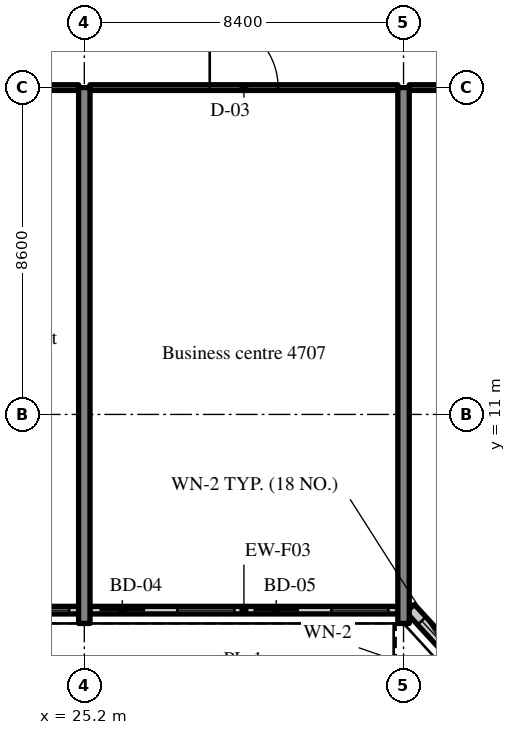
"""IFC4 building model, lengths in metres.
Left out: names, types, materials, properties, quantities, classifications, styles, units other than length and angle.
Written with IfcOpenShell. Run it as: python <this file> out.ifc"""

import sys

from ifc_helpers import new_model, si_unit, direction, frame, frame_2d, origin, place, context, subcontext, project, spatial, rectangle, extrude, source, transform, mapped, element, fill, save


model = new_model("IFC4")
c1 = context("Model", 3, precision=1e-05, world=origin(), true_north=direction((0.0, 1.0)))
c2 = subcontext(c1, "Body", "Model", "MODEL_VIEW")
j1 = project(units=[si_unit("LENGTHUNIT", "METRE"), si_unit("PLANEANGLEUNIT", "RADIAN")], contexts=[c1])
p1 = place(None, origin())
s1 = spatial("IfcSite", under=j1, at=p1, CompositionType="ELEMENT")
p2 = place(p1, origin())
s2 = spatial("IfcBuilding", under=s1, at=p2, CompositionType="ELEMENT")
p3 = place(p2, frame((0.0, 0.0, 193.4)))
s3 = spatial("IfcBuildingStorey", under=s2, at=p3, CompositionType="ELEMENT", Elevation=193.4)
m1 = source(origin(), c2, "Body", "SweptSolid", [
    extrude(rectangle(XDim=14.1, YDim=0.3, at=frame_2d((7.05, 0.0))), origin(), (0.0, 0.0, 1.0), 3.52),
])
for number, where, z_axis, x_axis in (
    (1, (25.2, 5.5, 0.0), (0.0, 0.0, 1.0), (0.0, 1.0, 0.0)),
    (2, (33.6, 5.5, 0.0), (0.0, 0.0, 1.0), (0.0, 1.0, 0.0)),
):
    element("IfcWall", number, at=place(p3, frame(where, z_axis=z_axis, x_axis=x_axis)), inside=s3, PredefinedType="SHEAR", context=c2, shape_type="MappedRepresentation", body=[
        mapped(m1, transform((0.0, 0.0, 0.0), scale=1.0)),
    ])
m2 = source(origin(), c2, "Body", "SweptSolid", [
    extrude(rectangle(XDim=8.1, YDim=0.2, at=frame_2d((4.05, 0.0))), origin(), (0.0, 0.0, 1.0), 2.87),
])
p4 = place(p3, frame((16.95, 5.85, 0.0), z_axis=(0.0, 0.0, 1.0), x_axis=(1.0, 0.0, 0.0)))
e3 = element("IfcWall", 3, at=p4, inside=s3, PredefinedType="SOLIDWALL", context=c2, shape_type="MappedRepresentation", body=[
    mapped(m2, transform((0.0, 0.0, 0.0), scale=1.0)),
])
m3 = source(origin(), c2, "Body", "SweptSolid", [
    extrude(rectangle(XDim=1.2, YDim=2.4, at=frame_2d((0.6, 1.2))), frame((0.0, 0.11, 0.0), z_axis=(0.0, -1.0, 0.0), x_axis=(1.0, 0.0, 0.0)), (0.0, 0.0, 1.0), 0.22),
])
p5 = place(p4, frame((0.25, 0.0, 0.0)))
e4 = element("IfcOpeningElement", 4, at=p5, cuts=e3, PredefinedType="OPENING", context=c2, shape_type="MappedRepresentation", body=[
    mapped(m3, transform((0.0, 0.0, 0.0), scale=1.0)),
])
m4 = source(origin(), c2, "Body", "SweptSolid", [
    extrude(rectangle(XDim=1.5, YDim=1.5, at=frame_2d((0.75, 0.75))), frame((0.0, 0.11, 0.0), z_axis=(0.0, -1.0, 0.0), x_axis=(1.0, 0.0, 0.0)), (0.0, 0.0, 1.0), 0.22),
])
p6 = place(p4, frame((2.3, 0.0, 0.9)))
e5 = element("IfcOpeningElement", 5, at=p6, cuts=e3, PredefinedType="OPENING", context=c2, shape_type="MappedRepresentation", body=[
    mapped(m4, transform((0.0, 0.0, 0.0), scale=1.0)),
])
p7 = place(p4, frame((4.3, 0.0, 0.0)))
e6 = element("IfcOpeningElement", 6, at=p7, cuts=e3, PredefinedType="OPENING", context=c2, shape_type="MappedRepresentation", body=[
    mapped(m3, transform((0.0, 0.0, 0.0), scale=1.0)),
])
p8 = place(p4, frame((6.35, 0.0, 0.9)))
e7 = element("IfcOpeningElement", 7, at=p8, cuts=e3, PredefinedType="OPENING", context=c2, shape_type="MappedRepresentation", body=[
    mapped(m4, transform((0.0, 0.0, 0.0), scale=1.0)),
])
m5 = source(origin(), c2, "Body", "SweptSolid", [
    extrude(rectangle(XDim=8.1, YDim=0.2, at=frame_2d((4.05, 0.0))), origin(), (0.0, 0.0, 1.0), 2.87),
])
p9 = place(p3, frame((25.35, 5.85, 0.0), z_axis=(0.0, 0.0, 1.0), x_axis=(1.0, 0.0, 0.0)))
e8 = element("IfcWall", 8, at=p9, inside=s3, PredefinedType="SOLIDWALL", context=c2, shape_type="MappedRepresentation", body=[
    mapped(m5, transform((0.0, 0.0, 0.0), scale=1.0)),
])
p10 = place(p9, frame((0.25, 0.0, 0.0)))
e9 = element("IfcOpeningElement", 9, at=p10, cuts=e8, PredefinedType="OPENING", context=c2, shape_type="MappedRepresentation", body=[
    mapped(m3, transform((0.0, 0.0, 0.0), scale=1.0)),
])
p11 = place(p9, frame((2.3, 0.0, 0.9)))
e10 = element("IfcOpeningElement", 10, at=p11, cuts=e8, PredefinedType="OPENING", context=c2, shape_type="MappedRepresentation", body=[
    mapped(m4, transform((0.0, 0.0, 0.0), scale=1.0)),
])
p12 = place(p9, frame((4.3, 0.0, 0.0)))
e11 = element("IfcOpeningElement", 11, at=p12, cuts=e8, PredefinedType="OPENING", context=c2, shape_type="MappedRepresentation", body=[
    mapped(m3, transform((0.0, 0.0, 0.0), scale=1.0)),
])
p13 = place(p9, frame((6.35, 0.0, 0.9)))
e12 = element("IfcOpeningElement", 12, at=p13, cuts=e8, PredefinedType="OPENING", context=c2, shape_type="MappedRepresentation", body=[
    mapped(m4, transform((0.0, 0.0, 0.0), scale=1.0)),
])
m6 = source(origin(), c2, "Body", "SweptSolid", [
    extrude(rectangle(XDim=2.398, YDim=0.3, at=frame_2d((1.199, 0.0))), origin(), (0.0, 0.0, 1.0), 3.52),
])
p14 = place(p3, frame((33.776, 5.9, 0.0), z_axis=(0.0, 0.0, 1.0), x_axis=(0.675374189419, -0.737475222815, 0.0)))
e13 = element("IfcWall", 13, at=p14, inside=s3, PredefinedType="SOLIDWALL", context=c2, shape_type="MappedRepresentation", body=[
    mapped(m6, transform((0.0, 0.0, 0.0), scale=1.0)),
])
m7 = source(origin(), c2, "Body", "SweptSolid", [
    extrude(rectangle(XDim=1.5, YDim=2.0, at=frame_2d((0.75, 1.0))), frame((0.0, 0.16, 0.0), z_axis=(0.0, -1.0, 0.0), x_axis=(1.0, 0.0, 0.0)), (0.0, 0.0, 1.0), 0.32),
])
p15 = place(p14, frame((0.449, 0.0, 0.9)))
e14 = element("IfcOpeningElement", 14, at=p15, cuts=e13, PredefinedType="OPENING", context=c2, shape_type="MappedRepresentation", body=[
    mapped(m7, transform((0.0, 0.0, 0.0), scale=1.0)),
])
m8 = source(origin(), c2, "Body", "SweptSolid", [
    extrude(rectangle(XDim=3.975, YDim=0.15, at=frame_2d((1.988, 0.0))), origin(), (0.0, 0.0, 1.0), 2.82),
])
p16 = place(p3, frame((21.075, 19.6, 0.0), z_axis=(0.0, 0.0, 1.0), x_axis=(1.0, 0.0, 0.0)))
e15 = element("IfcWall", 15, at=p16, inside=s3, PredefinedType="PARTITIONING", context=c2, shape_type="MappedRepresentation", body=[
    mapped(m8, transform((0.0, 0.0, 0.0), scale=1.0)),
])
m9 = source(origin(), c2, "Body", "SweptSolid", [
    extrude(rectangle(XDim=1.0, YDim=2.1, at=frame_2d((0.5, 1.05))), frame((0.0, 0.085, 0.0), z_axis=(0.0, -1.0, 0.0), x_axis=(1.0, 0.0, 0.0)), (0.0, 0.0, 1.0), 0.17),
])
p17 = place(p16, frame((1.488, 0.0, 0.0)))
e16 = element("IfcOpeningElement", 16, at=p17, cuts=e15, PredefinedType="OPENING", context=c2, shape_type="MappedRepresentation", body=[
    mapped(m9, transform((0.0, 0.0, 0.0), scale=1.0)),
])
m10 = source(origin(), c2, "Body", "SweptSolid", [
    extrude(rectangle(XDim=8.1, YDim=0.15, at=frame_2d((4.05, 0.0))), origin(), (0.0, 0.0, 1.0), 2.82),
])
p18 = place(p3, frame((25.35, 19.6, 0.0), z_axis=(0.0, 0.0, 1.0), x_axis=(1.0, 0.0, 0.0)))
e17 = element("IfcWall", 17, at=p18, inside=s3, PredefinedType="PARTITIONING", context=c2, shape_type="MappedRepresentation", body=[
    mapped(m10, transform((0.0, 0.0, 0.0), scale=1.0)),
])
m11 = source(origin(), c2, "Body", "SweptSolid", [
    extrude(rectangle(XDim=1.8, YDim=2.1, at=frame_2d((0.9, 1.05))), frame((0.0, 0.085, 0.0), z_axis=(0.0, -1.0, 0.0), x_axis=(1.0, 0.0, 0.0)), (0.0, 0.0, 1.0), 0.17),
])
p19 = place(p18, frame((3.15, 0.0, 0.0)))
e18 = element("IfcOpeningElement", 18, at=p19, cuts=e17, PredefinedType="OPENING", context=c2, shape_type="MappedRepresentation", body=[
    mapped(m11, transform((0.0, 0.0, 0.0), scale=1.0)),
])
m12 = source(origin(), c2, "Body", "SweptSolid", [
    extrude(rectangle(XDim=8.1, YDim=0.15, at=frame_2d((4.05, 0.0))), origin(), (0.0, 0.0, 1.0), 2.82),
])
p20 = place(p3, frame((33.75, 19.6, 0.0), z_axis=(0.0, 0.0, 1.0), x_axis=(1.0, 0.0, 0.0)))
e19 = element("IfcWall", 19, at=p20, inside=s3, PredefinedType="PARTITIONING", context=c2, shape_type="MappedRepresentation", body=[
    mapped(m12, transform((0.0, 0.0, 0.0), scale=1.0)),
])
p21 = place(p20, frame((3.15, 0.0, 0.0)))
e20 = element("IfcOpeningElement", 20, at=p21, cuts=e19, PredefinedType="OPENING", context=c2, shape_type="MappedRepresentation", body=[
    mapped(m11, transform((0.0, 0.0, 0.0), scale=1.0)),
])
m13 = source(origin(), c2, "Body", "SweptSolid", [
    extrude(rectangle(XDim=1.5, YDim=1.5, at=frame_2d((0.75, 0.75))), frame((0.0, 0.03, 0.0), z_axis=(0.0, -1.0, 0.0), x_axis=(1.0, 0.0, 0.0)), (0.0, 0.0, 1.0), 0.06),
])
p22 = place(p8, origin())
e21 = element("IfcWindow", 21, at=p22, inside=s3, PartitioningType="SINGLE_PANEL", PredefinedType="WINDOW", context=c2, shape_type="MappedRepresentation", body=[
    mapped(m13, transform((0.0, 0.0, 0.0), scale=1.0)),
])
fill(e7, e21)
m14 = source(origin(), c2, "Body", "SweptSolid", [
    extrude(rectangle(XDim=1.2, YDim=2.4, at=frame_2d((0.6, 1.2))), frame((0.0, 0.025, 0.0), z_axis=(0.0, -1.0, 0.0), x_axis=(1.0, 0.0, 0.0)), (0.0, 0.0, 1.0), 0.05),
])
p23 = place(p10, origin())
e22 = element("IfcDoor", 22, at=p23, inside=s3, OperationType="SLIDING_TO_RIGHT", PredefinedType="DOOR", context=c2, shape_type="MappedRepresentation", body=[
    mapped(m14, transform((0.0, 0.0, 0.0), scale=1.0)),
])
fill(e9, e22)
p24 = place(p11, origin())
e23 = element("IfcWindow", 23, at=p24, inside=s3, PartitioningType="SINGLE_PANEL", PredefinedType="WINDOW", context=c2, shape_type="MappedRepresentation", body=[
    mapped(m13, transform((0.0, 0.0, 0.0), scale=1.0)),
])
fill(e10, e23)
p25 = place(p12, origin())
e24 = element("IfcDoor", 24, at=p25, inside=s3, OperationType="SLIDING_TO_LEFT", PredefinedType="DOOR", context=c2, shape_type="MappedRepresentation", body=[
    mapped(m14, transform((0.0, 0.0, 0.0), scale=1.0)),
])
fill(e11, e24)
p26 = place(p13, origin())
e25 = element("IfcWindow", 25, at=p26, inside=s3, PartitioningType="SINGLE_PANEL", PredefinedType="WINDOW", context=c2, shape_type="MappedRepresentation", body=[
    mapped(m13, transform((0.0, 0.0, 0.0), scale=1.0)),
])
fill(e12, e25)
m15 = source(origin(), c2, "Body", "SweptSolid", [
    extrude(rectangle(XDim=1.5, YDim=2.0, at=frame_2d((0.75, 1.0))), frame((0.0, 0.03, 0.0), z_axis=(0.0, -1.0, 0.0), x_axis=(1.0, 0.0, 0.0)), (0.0, 0.0, 1.0), 0.06),
])
p27 = place(p15, origin())
e26 = element("IfcWindow", 26, at=p27, inside=s3, PartitioningType="SINGLE_PANEL", PredefinedType="WINDOW", context=c2, shape_type="MappedRepresentation", body=[
    mapped(m15, transform((0.0, 0.0, 0.0), scale=1.0)),
])
fill(e14, e26)
m16 = source(origin(), c2, "Body", "SweptSolid", [
    extrude(rectangle(XDim=1.8, YDim=2.1, at=frame_2d((0.9, 1.05))), frame((0.0, 0.025, 0.0), z_axis=(0.0, -1.0, 0.0), x_axis=(1.0, 0.0, 0.0)), (0.0, 0.0, 1.0), 0.05),
])
p28 = place(p19, origin())
e27 = element("IfcDoor", 27, at=p28, inside=s3, OperationType="DOUBLE_DOOR_SINGLE_SWING", PredefinedType="DOOR", context=c2, shape_type="MappedRepresentation", body=[
    mapped(m16, transform((0.0, 0.0, 0.0), scale=1.0)),
])
fill(e18, e27)
save(model, sys.argv[1])
